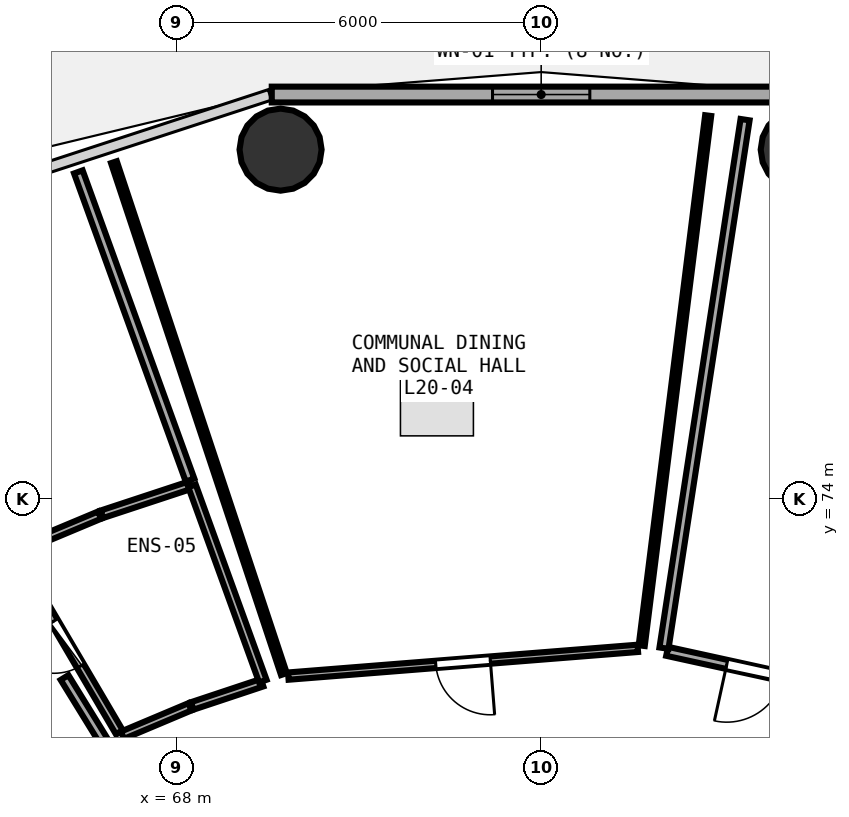
"""IFC4 building model, lengths in metres.
Left out: names, types, materials, properties, quantities, classifications, styles, units other than length and angle.
Written with IfcOpenShell. Run it as: python <this file> out.ifc"""

import sys

from ifc_helpers import new_model, si_unit, direction, frame, frame_2d, origin, origin_2d, place, context, subcontext, project, spatial, rectangle, circle, extrude, element, fill, save


model = new_model("IFC4")
c1 = context("Model", 3, precision=1e-05, world=origin(), true_north=direction((0.0, 1.0)))
c2 = subcontext(c1, "Body", "Model", "MODEL_VIEW")
j1 = project(units=[si_unit("LENGTHUNIT", "METRE"), si_unit("PLANEANGLEUNIT", "RADIAN")], contexts=[c1])
p1 = place(None, origin())
s1 = spatial("IfcSite", under=j1, at=p1, CompositionType="ELEMENT")
p2 = place(p1, origin())
s2 = spatial("IfcBuilding", under=s1, at=p2, CompositionType="ELEMENT")
p3 = place(p2, frame((0.0, 0.0, 80.1)))
s3 = spatial("IfcBuildingStorey", under=s2, at=p3, CompositionType="ELEMENT", Elevation=80.1)
for number, where, z_axis, x_axis in (
    (1, (78.286, 79.745, 0.0), (0.0, 0.0, 1.0), (1.0, 0.0, 0.0)),
    (2, (69.714, 79.745, 0.0), (0.0, 0.0, 1.0), (1.0, 0.0, 0.0)),
):
    element("IfcColumn", number, at=place(p3, frame(where, z_axis=z_axis, x_axis=x_axis)), inside=s3, PredefinedType="COLUMN", context=c2, shape_type="SweptSolid", body=[
        extrude(circle(Radius=0.675, at=origin_2d()), origin(), (0.0, 0.0, 1.0), 3.75),
    ])
p4 = place(p3, frame((78.43, 80.651, 0.0), z_axis=(0.0, 0.0, 1.0), x_axis=(-1.0, 0.0, 0.0)))
e3 = element("IfcWall", 3, at=p4, inside=s3, PredefinedType="SOLIDWALL", context=c2, shape_type="SweptSolid", body=[
    extrude(rectangle(XDim=8.861, YDim=0.26, at=frame_2d((4.43, 0.0))), origin(), (0.0, 0.0, 1.0), 3.475),
])
p5 = place(p4, frame((3.63, 0.0, 0.85)))
e4 = element("IfcOpeningElement", 4, at=p5, cuts=e3, PredefinedType="OPENING", context=c2, shape_type="SweptSolid", body=[
    extrude(rectangle(XDim=1.6, YDim=1.45, at=frame_2d((0.8, 0.725))), frame((0.0, 0.14, 0.0), z_axis=(0.0, -1.0, 0.0), x_axis=(1.0, 0.0, 0.0)), (0.0, 0.0, 1.0), 0.28),
])
p6 = place(p3, frame((78.96, 70.861, 0.0), z_axis=(0.0, 0.0, 1.0), x_axis=(-0.976789452363, 0.214201694093, 0.0)))
e5 = element("IfcWall", 5, at=p6, inside=s3, PredefinedType="PARTITIONING", context=c2, shape_type="SweptSolid", body=[
    extrude(rectangle(XDim=2.957, YDim=0.15, at=frame_2d((1.478, 0.0))), origin(), (0.0, 0.0, 1.0), 3.48),
])
p7 = place(p6, frame((1.003, 0.0, 0.0)))
e6 = element("IfcOpeningElement", 6, at=p7, cuts=e5, PredefinedType="OPENING", context=c2, shape_type="SweptSolid", body=[
    extrude(rectangle(XDim=0.95, YDim=2.08, at=frame_2d((0.475, 1.04))), frame((0.0, 0.085, 0.0), z_axis=(0.0, -1.0, 0.0), x_axis=(1.0, 0.0, 0.0)), (0.0, 0.0, 1.0), 0.17),
])
p8 = place(p3, frame((75.589, 71.543, 0.0), z_axis=(0.0, 0.0, 1.0), x_axis=(-0.996863165686, -0.079144354814, 0.0)))
e7 = element("IfcWall", 7, at=p8, inside=s3, PredefinedType="PARTITIONING", context=c2, shape_type="SweptSolid", body=[
    extrude(rectangle(XDim=5.765, YDim=0.12, at=frame_2d((2.883, 0.0))), origin(), (0.0, 0.0, 1.0), 2.925),
])
p9 = place(p8, frame((2.433, 0.0, 0.0)))
e8 = element("IfcOpeningElement", 8, at=p9, cuts=e7, PredefinedType="OPENING", context=c2, shape_type="SweptSolid", body=[
    extrude(rectangle(XDim=0.9, YDim=2.08, at=frame_2d((0.45, 1.04))), frame((0.0, 0.07, 0.0), z_axis=(0.0, -1.0, 0.0), x_axis=(1.0, 0.0, 0.0)), (0.0, 0.0, 1.0), 0.14),
])
p10 = place(p3, frame((67.066, 70.159, 0.0), z_axis=(0.0, 0.0, 1.0), x_axis=(-0.506831608452, 0.862045080419, 0.0)))
e9 = element("IfcWall", 9, at=p10, inside=s3, PredefinedType="PLUMBINGWALL", context=c2, shape_type="SweptSolid", body=[
    extrude(rectangle(XDim=3.396, YDim=0.13, at=frame_2d((1.698, 0.0))), origin(), (0.0, 0.0, 1.0), 3.175),
])
p11 = place(p10, frame((1.268, 0.0, 0.0)))
e10 = element("IfcOpeningElement", 10, at=p11, cuts=e9, PredefinedType="OPENING", context=c2, shape_type="SweptSolid", body=[
    extrude(rectangle(XDim=0.86, YDim=2.05, at=frame_2d((0.43, 1.025))), frame((0.0, 0.075, 0.0), z_axis=(0.0, -1.0, 0.0), x_axis=(1.0, 0.0, 0.0)), (0.0, 0.0, 1.0), 0.15),
])
p12 = place(p3, frame((76.02, 71.546, 0.0), z_axis=(0.0, 0.0, 1.0), x_axis=(0.151710828081, 0.988424921096, 0.0)))
e11 = element("IfcWall", 11, at=p12, inside=s3, PredefinedType="PARTITIONING", context=c2, shape_type="SweptSolid", body=[
    extrude(rectangle(XDim=8.793, YDim=0.15, at=frame_2d((4.396, 0.0))), origin(), (0.0, 0.0, 1.0), 2.975),
])
p13 = place(p3, frame((69.769, 71.12, 0.0), z_axis=(0.0, 0.0, 1.0), x_axis=(-0.315178903164, 0.949032275005, 0.0)))
e12 = element("IfcWall", 12, at=p13, inside=s3, PredefinedType="PARTITIONING", context=c2, shape_type="SweptSolid", body=[
    extrude(rectangle(XDim=8.87, YDim=0.1, at=frame_2d((4.435, 0.0))), origin(), (0.0, 0.0, 1.0), 2.975),
])
p14 = place(p3, frame((76.747, 80.304, 0.0), z_axis=(0.0, 0.0, 1.0), x_axis=(-0.124421236745, -0.992229487491, 0.0)))
e13 = element("IfcWall", 13, at=p14, inside=s3, PredefinedType="PARTITIONING", context=c2, shape_type="SweptSolid", body=[
    extrude(rectangle(XDim=8.785, YDim=0.1, at=frame_2d((4.393, 0.0))), origin(), (0.0, 0.0, 1.0), 2.975),
])
p15 = place(p3, frame((69.411, 70.979, 0.0), z_axis=(0.0, 0.0, 1.0), x_axis=(-0.948784055635, -0.315925332592, 0.0)))
e14 = element("IfcWall", 14, at=p15, inside=s3, PredefinedType="PLUMBINGWALL", context=c2, shape_type="SweptSolid", body=[
    extrude(rectangle(XDim=1.211, YDim=0.13, at=frame_2d((0.605, 0.0))), origin(), (0.0, 0.0, 1.0), 3.48),
])
p16 = place(p3, frame((68.225, 70.582, 0.0), z_axis=(0.0, 0.0, 1.0), x_axis=(-0.921601034592, -0.388138548767, 0.0)))
e15 = element("IfcWall", 15, at=p16, inside=s3, PredefinedType="PLUMBINGWALL", context=c2, shape_type="SweptSolid", body=[
    extrude(rectangle(XDim=1.205, YDim=0.13, at=frame_2d((0.602, 0.0))), origin(), (0.0, 0.0, 1.0), 3.235),
])
p17 = place(p3, frame((65.333, 73.146, 0.0), z_axis=(0.0, 0.0, 1.0), x_axis=(0.922426393113, 0.38617295256, 0.0)))
e16 = element("IfcWall", 16, at=p17, inside=s3, PredefinedType="PLUMBINGWALL", context=c2, shape_type="SweptSolid", body=[
    extrude(rectangle(XDim=1.524, YDim=0.13, at=frame_2d((0.762, 0.0))), origin(), (0.0, 0.0, 1.0), 3.48),
])
p18 = place(p3, frame((66.776, 73.748, 0.0), z_axis=(0.0, 0.0, 1.0), x_axis=(0.949634335139, 0.313360223265, 0.0)))
e17 = element("IfcWall", 17, at=p18, inside=s3, PredefinedType="PLUMBINGWALL", context=c2, shape_type="SweptSolid", body=[
    extrude(rectangle(XDim=1.533, YDim=0.13, at=frame_2d((0.767, 0.0))), origin(), (0.0, 0.0, 1.0), 3.48),
])
p19 = place(p3, frame((68.258, 74.216, 0.0), z_axis=(0.0, 0.0, 1.0), x_axis=(0.341002962554, -0.940062221095, 0.0)))
e18 = element("IfcWall", 18, at=p19, inside=s3, PredefinedType="PLUMBINGWALL", context=c2, shape_type="SweptSolid", body=[
    extrude(rectangle(XDim=3.417, YDim=0.13, at=frame_2d((1.708, 0.0))), origin(), (0.0, 0.0, 1.0), 3.175),
])
p20 = place(p3, frame((66.389, 79.378, 0.0), z_axis=(0.0, 0.0, 1.0), x_axis=(0.340728267281, -0.940161820048, 0.0)))
e19 = element("IfcWall", 19, at=p20, inside=s3, PredefinedType="PARTITIONING", context=c2, shape_type="SweptSolid", body=[
    extrude(rectangle(XDim=5.39, YDim=0.15, at=frame_2d((2.695, 0.0))), origin(), (0.0, 0.0, 1.0), 2.975),
])
p21 = place(p3, frame((66.162, 71.063, 0.0), z_axis=(0.0, 0.0, 1.0), x_axis=(0.52475967521, -0.851250423362, 0.0)))
e20 = element("IfcWall", 20, at=p21, inside=s3, PredefinedType="PARTITIONING", context=c2, shape_type="SweptSolid", body=[
    extrude(rectangle(XDim=1.234, YDim=0.15, at=frame_2d((0.617, 0.0))), origin(), (0.0, 0.0, 1.0), 3.235),
])
p22 = place(p5, origin())
e21 = element("IfcWindow", 21, at=p22, inside=s3, PartitioningType="SINGLE_PANEL", PredefinedType="WINDOW", context=c2, shape_type="SweptSolid", body=[
    extrude(rectangle(XDim=1.6, YDim=1.45, at=frame_2d((0.8, 0.725))), frame((0.0, 0.03, 0.0), z_axis=(0.0, -1.0, 0.0), x_axis=(1.0, 0.0, 0.0)), (0.0, 0.0, 1.0), 0.06),
])
fill(e4, e21)
p23 = place(p7, origin())
e22 = element("IfcDoor", 22, at=p23, inside=s3, OperationType="SINGLE_SWING_RIGHT", PredefinedType="DOOR", context=c2, shape_type="SweptSolid", body=[
    extrude(rectangle(XDim=0.95, YDim=2.08, at=frame_2d((0.475, 1.04))), frame((0.0, 0.025, 0.0), z_axis=(0.0, -1.0, 0.0), x_axis=(1.0, 0.0, 0.0)), (0.0, 0.0, 1.0), 0.05),
])
fill(e6, e22)
p24 = place(p9, origin())
e23 = element("IfcDoor", 23, at=p24, inside=s3, OperationType="SINGLE_SWING_LEFT", PredefinedType="DOOR", context=c2, shape_type="SweptSolid", body=[
    extrude(rectangle(XDim=0.9, YDim=2.08, at=frame_2d((0.45, 1.04))), frame((0.0, 0.025, 0.0), z_axis=(0.0, -1.0, 0.0), x_axis=(1.0, 0.0, 0.0)), (0.0, 0.0, 1.0), 0.05),
])
fill(e8, e23)
p25 = place(p11, origin())
e24 = element("IfcDoor", 24, at=p25, inside=s3, OperationType="SINGLE_SWING_RIGHT", PredefinedType="DOOR", context=c2, shape_type="SweptSolid", body=[
    extrude(rectangle(XDim=0.86, YDim=2.05, at=frame_2d((0.43, 1.025))), frame((0.0, 0.025, 0.0), z_axis=(0.0, -1.0, 0.0), x_axis=(1.0, 0.0, 0.0)), (0.0, 0.0, 1.0), 0.05),
])
fill(e10, e24)
save(model, sys.argv[1])
